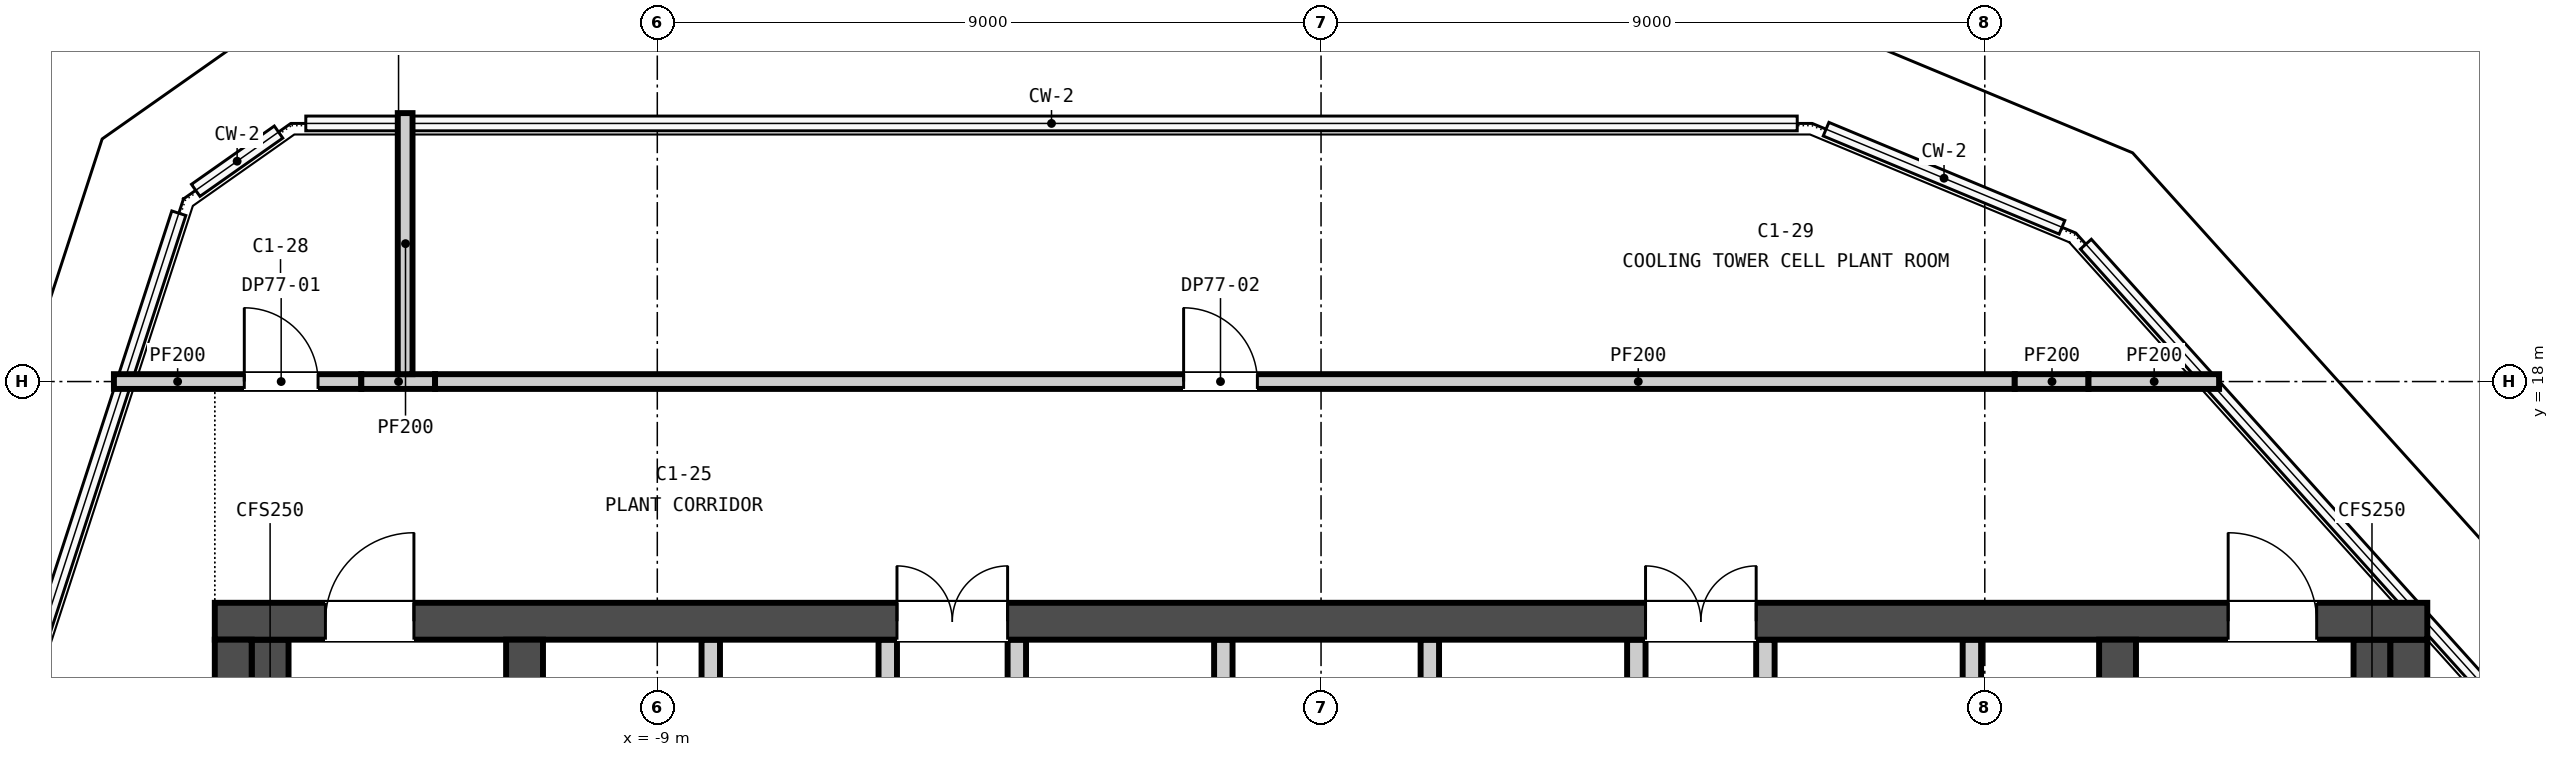
"""IFC4 building model, lengths in metres.
Left out: names, types, materials, properties, quantities, classifications, styles, units other than length and angle.
Written with IfcOpenShell. Run it as: python <this file> out.ifc"""

import sys

from ifc_helpers import new_model, si_unit, direction, frame, frame_2d, origin, place, context, subcontext, project, spatial, rectangle, extrude, element, fill, save


model = new_model("IFC4")
c1 = context("Model", 3, precision=1e-05, world=origin(), true_north=direction((0.0, 1.0)))
c2 = subcontext(c1, "Body", "Model", "MODEL_VIEW")
j1 = project(units=[si_unit("LENGTHUNIT", "METRE"), si_unit("PLANEANGLEUNIT", "RADIAN")], contexts=[c1])
p1 = place(None, origin())
s1 = spatial("IfcSite", under=j1, at=p1, CompositionType="ELEMENT")
p2 = place(p1, origin())
s2 = spatial("IfcBuilding", under=s1, at=p2, CompositionType="ELEMENT")
p3 = place(p2, frame((0.0, 0.0, 301.1)))
s3 = spatial("IfcBuildingStorey", under=s2, at=p3, CompositionType="ELEMENT", Elevation=301.1)
p4 = place(p3, frame((-15.0, 14.75, -0.25), z_axis=(0.0, 0.0, 1.0), x_axis=(1.0, 0.0, 0.0)))
e1 = element("IfcWall", 1, at=p4, inside=s3, PredefinedType="SOLIDWALL", context=c2, shape_type="SweptSolid", body=[
    extrude(rectangle(XDim=30.0, YDim=0.5, at=frame_2d((15.0, 0.0))), origin(), (0.0, 0.0, 1.0), 5.0),
])
p5 = place(p4, frame((9.25, 0.0, 0.25)))
e2 = element("IfcOpeningElement", 2, at=p5, cuts=e1, PredefinedType="OPENING", context=c2, shape_type="SweptSolid", body=[
    extrude(rectangle(XDim=1.5, YDim=2.1, at=frame_2d((0.75, 1.05))), frame((0.0, 0.26, 0.0), z_axis=(0.0, -1.0, 0.0), x_axis=(1.0, 0.0, 0.0)), (0.0, 0.0, 1.0), 0.52),
])
p6 = place(p4, frame((19.4, 0.0, 0.25)))
e3 = element("IfcOpeningElement", 3, at=p6, cuts=e1, PredefinedType="OPENING", context=c2, shape_type="SweptSolid", body=[
    extrude(rectangle(XDim=1.5, YDim=2.1, at=frame_2d((0.75, 1.05))), frame((0.0, 0.26, 0.0), z_axis=(0.0, -1.0, 0.0), x_axis=(1.0, 0.0, 0.0)), (0.0, 0.0, 1.0), 0.52),
])
p7 = place(p4, frame((1.5, 0.0, 0.25)))
e4 = element("IfcOpeningElement", 4, at=p7, cuts=e1, PredefinedType="OPENING", context=c2, shape_type="SweptSolid", body=[
    extrude(rectangle(XDim=1.2, YDim=2.1, at=frame_2d((0.6, 1.05))), frame((0.0, 0.26, 0.0), z_axis=(0.0, -1.0, 0.0), x_axis=(1.0, 0.0, 0.0)), (0.0, 0.0, 1.0), 0.52),
])
p8 = place(p4, frame((27.3, 0.0, 0.25)))
e5 = element("IfcOpeningElement", 5, at=p8, cuts=e1, PredefinedType="OPENING", context=c2, shape_type="SweptSolid", body=[
    extrude(rectangle(XDim=1.2, YDim=2.1, at=frame_2d((0.6, 1.05))), frame((0.0, 0.26, 0.0), z_axis=(0.0, -1.0, 0.0), x_axis=(1.0, 0.0, 0.0)), (0.0, 0.0, 1.0), 0.52),
])
for number, where, z_axis, x_axis in (
    (6, (-14.75, 0.5, -0.25), (0.0, 0.0, 1.0), (0.0, 1.0, 0.0)),
    (7, (14.75, 0.5, -0.25), (0.0, 0.0, 1.0), (0.0, 1.0, 0.0)),
    (8, (-10.8, 0.5, -0.25), (0.0, 0.0, 1.0), (0.0, 1.0, 0.0)),
    (9, (10.8, 0.5, -0.25), (0.0, 0.0, 1.0), (0.0, 1.0, 0.0)),
):
    element("IfcWall", number, at=place(p3, frame(where, z_axis=z_axis, x_axis=x_axis)), inside=s3, PredefinedType="SOLIDWALL", context=c2, shape_type="SweptSolid", body=[
        extrude(rectangle(XDim=14.0, YDim=0.5, at=frame_2d((7.0, 0.0))), origin(), (0.0, 0.0, 1.0), 5.0),
    ])
for number, where, z_axis, x_axis in (
    (10, (-8.275, 11.3, 0.0), (0.0, 0.0, 1.0), (0.0, 1.0, 0.0)),
    (11, (-5.875, 11.3, 0.0), (0.0, 0.0, 1.0), (0.0, 1.0, 0.0)),
    (12, (-4.125, 11.3, 0.0), (0.0, 0.0, 1.0), (0.0, 1.0, 0.0)),
    (13, (-1.325, 11.3, 0.0), (0.0, 0.0, 1.0), (0.0, 1.0, 0.0)),
    (14, (1.475, 11.3, 0.0), (0.0, 0.0, 1.0), (0.0, 1.0, 0.0)),
    (15, (4.275, 11.3, 0.0), (0.0, 0.0, 1.0), (0.0, 1.0, 0.0)),
    (16, (6.025, 11.3, 0.0), (0.0, 0.0, 1.0), (0.0, 1.0, 0.0)),
    (17, (8.825, 11.3, 0.0), (0.0, 0.0, 1.0), (0.0, 1.0, 0.0)),
):
    element("IfcWall", number, at=place(p3, frame(where, z_axis=z_axis, x_axis=x_axis)), inside=s3, PredefinedType="PARTITIONING", context=c2, shape_type="SweptSolid", body=[
        extrude(rectangle(XDim=3.2, YDim=0.25, at=frame_2d((1.6, 0.0))), origin(), (0.0, 0.0, 1.0), 4.75),
    ])
for number, where, z_axis, x_axis in (
    (18, (-14.25, 0.5, 0.0), (0.0, 0.0, 1.0), (0.0, 1.0, 0.0)),
    (19, (14.25, 0.5, 0.0), (0.0, 0.0, 1.0), (0.0, 1.0, 0.0)),
):
    element("IfcWall", number, at=place(p3, frame(where, z_axis=z_axis, x_axis=x_axis)), inside=s3, PredefinedType="SOLIDWALL", context=c2, shape_type="SweptSolid", body=[
        extrude(rectangle(XDim=14.0, YDim=0.5, at=frame_2d((7.0, 0.0))), origin(), (0.0, 0.0, 1.0), 4.75),
    ])
p9 = place(p3, frame((-16.368, 18.0, 0.0), z_axis=(0.0, 0.0, 1.0), x_axis=(1.0, 0.0, 0.0)))
e20 = element("IfcWall", 20, at=p9, inside=s3, PredefinedType="PARTITIONING", context=c2, shape_type="SweptSolid", body=[
    extrude(rectangle(XDim=3.354, YDim=0.2, at=frame_2d((1.677, 0.0))), origin(), (0.0, 0.0, 1.0), 4.75),
])
p10 = place(p9, frame((1.768, 0.0, 0.0)))
e21 = element("IfcOpeningElement", 21, at=p10, cuts=e20, PredefinedType="OPENING", context=c2, shape_type="SweptSolid", body=[
    extrude(rectangle(XDim=1.0, YDim=2.1, at=frame_2d((0.5, 1.05))), frame((0.0, 0.11, 0.0), z_axis=(0.0, -1.0, 0.0), x_axis=(1.0, 0.0, 0.0)), (0.0, 0.0, 1.0), 0.22),
])
p11 = place(p3, frame((-13.013, 18.0, 0.0), z_axis=(0.0, 0.0, 1.0), x_axis=(1.0, 0.0, 0.0)))
e22 = element("IfcWall", 22, at=p11, inside=s3, PredefinedType="PARTITIONING", context=c2, shape_type="SweptSolid", body=[
    extrude(rectangle(XDim=1.0, YDim=0.2, at=frame_2d((0.5, 0.0))), origin(), (0.0, 0.0, 1.0), 4.15),
])
p12 = place(p3, frame((-12.013, 18.0, 0.0), z_axis=(0.0, 0.0, 1.0), x_axis=(1.0, 0.0, 0.0)))
e23 = element("IfcWall", 23, at=p12, inside=s3, PredefinedType="PARTITIONING", context=c2, shape_type="SweptSolid", body=[
    extrude(rectangle(XDim=21.42, YDim=0.2, at=frame_2d((10.71, 0.0))), origin(), (0.0, 0.0, 1.0), 4.75),
])
p13 = place(p12, frame((10.15, 0.0, 0.0)))
e24 = element("IfcOpeningElement", 24, at=p13, cuts=e23, PredefinedType="OPENING", context=c2, shape_type="SweptSolid", body=[
    extrude(rectangle(XDim=1.0, YDim=2.1, at=frame_2d((0.5, 1.05))), frame((0.0, 0.11, 0.0), z_axis=(0.0, -1.0, 0.0), x_axis=(1.0, 0.0, 0.0)), (0.0, 0.0, 1.0), 0.22),
])
p14 = place(p3, frame((9.406, 18.0, 0.0), z_axis=(0.0, 0.0, 1.0), x_axis=(1.0, 0.0, 0.0)))
e25 = element("IfcWall", 25, at=p14, inside=s3, PredefinedType="PARTITIONING", context=c2, shape_type="SweptSolid", body=[
    extrude(rectangle(XDim=1.0, YDim=0.2, at=frame_2d((0.5, 0.0))), origin(), (0.0, 0.0, 1.0), 4.226),
])
p15 = place(p3, frame((10.406, 18.0, 0.0), z_axis=(0.0, 0.0, 1.0), x_axis=(1.0, 0.0, 0.0)))
e26 = element("IfcWall", 26, at=p15, inside=s3, PredefinedType="PARTITIONING", context=c2, shape_type="SweptSolid", body=[
    extrude(rectangle(XDim=1.771, YDim=0.2, at=frame_2d((0.885, 0.0))), origin(), (0.0, 0.0, 1.0), 4.75),
])
p16 = place(p3, frame((-12.419, 18.1, 0.0), z_axis=(0.0, 0.0, 1.0), x_axis=(0.0, 1.0, 0.0)))
e27 = element("IfcWall", 27, at=p16, inside=s3, PredefinedType="PARTITIONING", context=c2, shape_type="SweptSolid", body=[
    extrude(rectangle(XDim=3.54, YDim=0.2, at=frame_2d((1.77, 0.0))), origin(), (0.0, 0.0, 1.0), 4.75),
])
p17 = place(p5, origin())
e28 = element("IfcDoor", 28, at=p17, inside=s3, OperationType="DOUBLE_DOOR_SINGLE_SWING", PredefinedType="DOOR", context=c2, shape_type="SweptSolid", body=[
    extrude(rectangle(XDim=1.5, YDim=2.1, at=frame_2d((0.75, 1.05))), frame((0.0, 0.025, 0.0), z_axis=(0.0, -1.0, 0.0), x_axis=(1.0, 0.0, 0.0)), (0.0, 0.0, 1.0), 0.05),
])
fill(e2, e28)
p18 = place(p6, origin())
e29 = element("IfcDoor", 29, at=p18, inside=s3, OperationType="DOUBLE_DOOR_SINGLE_SWING", PredefinedType="DOOR", context=c2, shape_type="SweptSolid", body=[
    extrude(rectangle(XDim=1.5, YDim=2.1, at=frame_2d((0.75, 1.05))), frame((0.0, 0.025, 0.0), z_axis=(0.0, -1.0, 0.0), x_axis=(1.0, 0.0, 0.0)), (0.0, 0.0, 1.0), 0.05),
])
fill(e3, e29)
p19 = place(p7, origin())
e30 = element("IfcDoor", 30, at=p19, inside=s3, OperationType="SINGLE_SWING_RIGHT", PredefinedType="DOOR", context=c2, shape_type="SweptSolid", body=[
    extrude(rectangle(XDim=1.2, YDim=2.1, at=frame_2d((0.6, 1.05))), frame((0.0, 0.025, 0.0), z_axis=(0.0, -1.0, 0.0), x_axis=(1.0, 0.0, 0.0)), (0.0, 0.0, 1.0), 0.05),
])
fill(e4, e30)
p20 = place(p8, origin())
e31 = element("IfcDoor", 31, at=p20, inside=s3, OperationType="SINGLE_SWING_LEFT", PredefinedType="DOOR", context=c2, shape_type="SweptSolid", body=[
    extrude(rectangle(XDim=1.2, YDim=2.1, at=frame_2d((0.6, 1.05))), frame((0.0, 0.025, 0.0), z_axis=(0.0, -1.0, 0.0), x_axis=(1.0, 0.0, 0.0)), (0.0, 0.0, 1.0), 0.05),
])
fill(e5, e31)
p21 = place(p10, origin())
e32 = element("IfcDoor", 32, at=p21, inside=s3, OperationType="SINGLE_SWING_LEFT", PredefinedType="DOOR", context=c2, shape_type="SweptSolid", body=[
    extrude(rectangle(XDim=1.0, YDim=2.1, at=frame_2d((0.5, 1.05))), frame((0.0, 0.025, 0.0), z_axis=(0.0, -1.0, 0.0), x_axis=(1.0, 0.0, 0.0)), (0.0, 0.0, 1.0), 0.05),
])
fill(e21, e32)
p22 = place(p13, origin())
e33 = element("IfcDoor", 33, at=p22, inside=s3, OperationType="SINGLE_SWING_LEFT", PredefinedType="DOOR", context=c2, shape_type="SweptSolid", body=[
    extrude(rectangle(XDim=1.0, YDim=2.1, at=frame_2d((0.5, 1.05))), frame((0.0, 0.025, 0.0), z_axis=(0.0, -1.0, 0.0), x_axis=(1.0, 0.0, 0.0)), (0.0, 0.0, 1.0), 0.05),
])
fill(e24, e33)
save(model, sys.argv[1])
